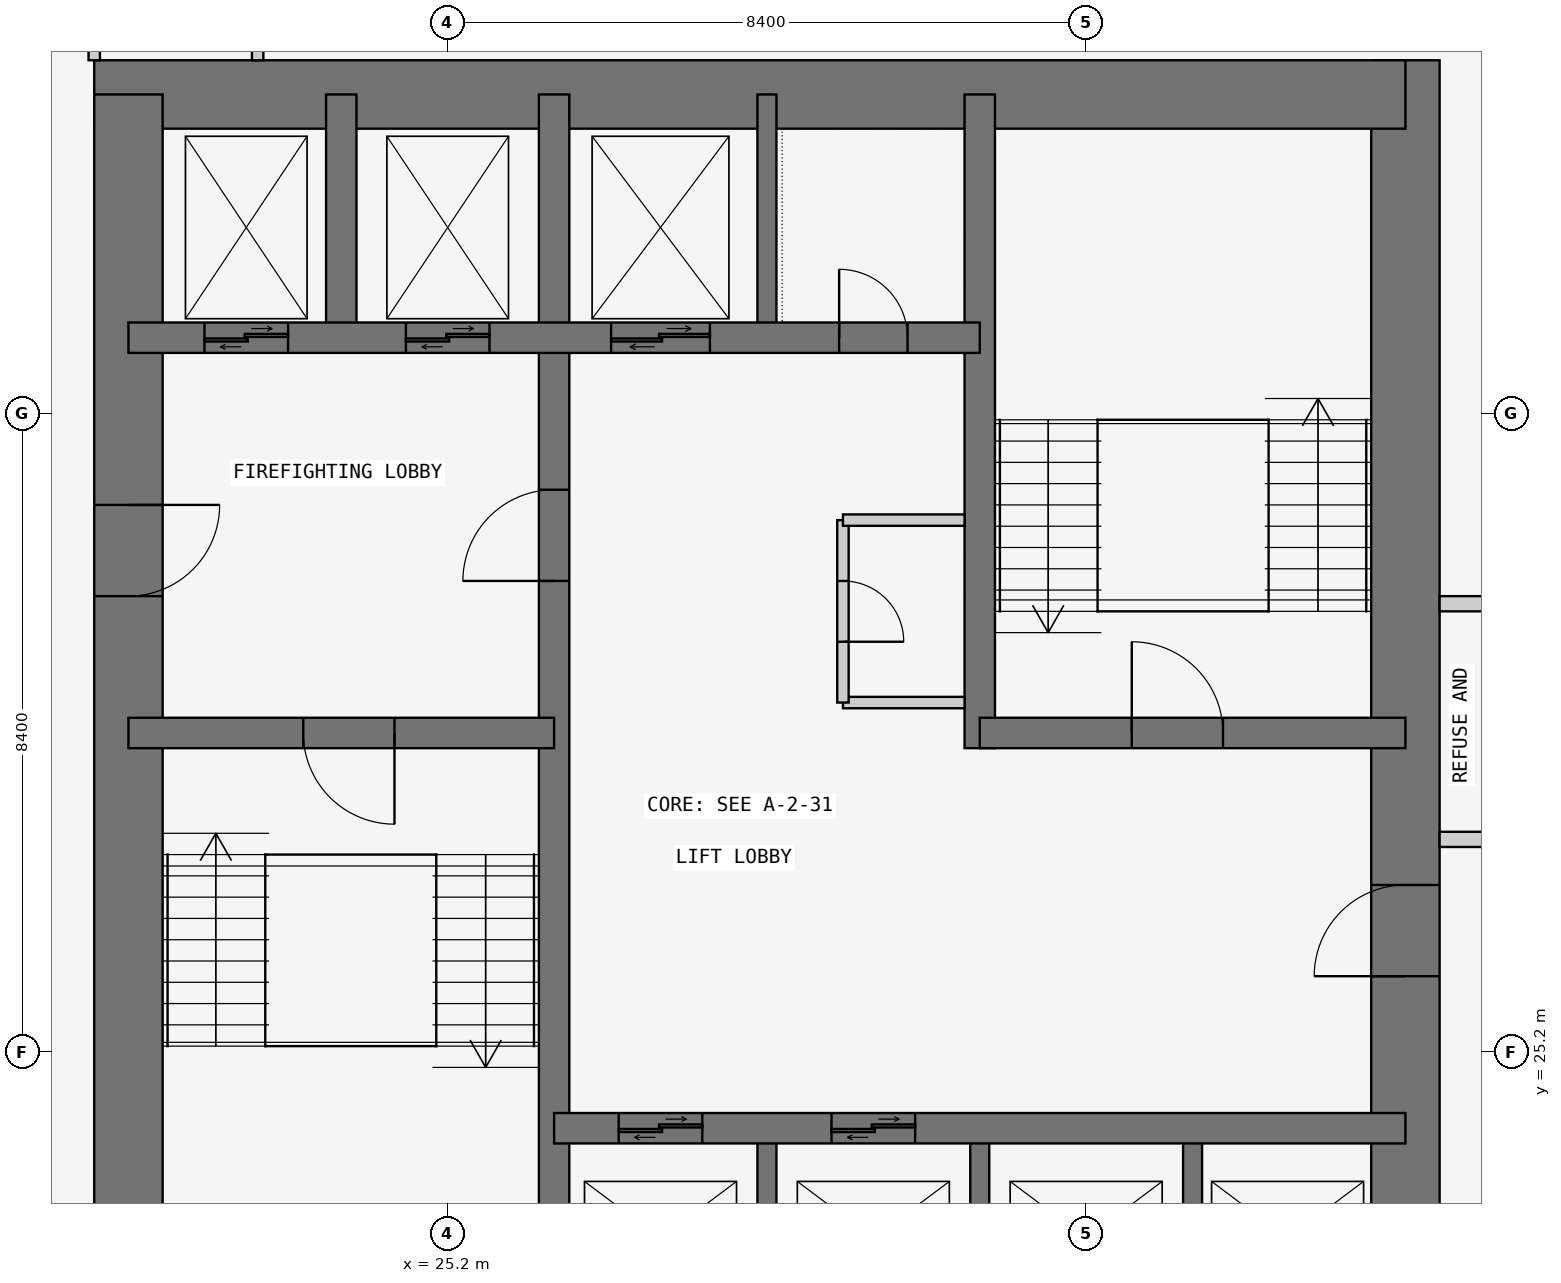
"""IFC4 building model, lengths in metres.
Left out: names, types, materials, properties, quantities, classifications, styles, units other than length and angle.
Written with IfcOpenShell. Run it as: python <this file> out.ifc"""

import sys

from ifc_helpers import new_model, si_unit, direction, frame, frame_2d, origin, place, context, subcontext, project, spatial, rectangle, extrude, element, fill, save


model = new_model("IFC4")
c1 = context("Model", 3, precision=1e-05, world=origin(), true_north=direction((0.0, 1.0)))
c2 = subcontext(c1, "Body", "Model", "MODEL_VIEW")
j1 = project(units=[si_unit("LENGTHUNIT", "METRE"), si_unit("PLANEANGLEUNIT", "RADIAN")], contexts=[c1])
p1 = place(None, origin())
s1 = spatial("IfcSite", under=j1, at=p1, CompositionType="ELEMENT")
p2 = place(p1, origin())
s2 = spatial("IfcBuilding", under=s1, at=p2, CompositionType="ELEMENT")
p3 = place(p2, frame((0.0, 0.0, 112.5)))
s3 = spatial("IfcBuildingStorey", under=s2, at=p3, CompositionType="ELEMENT", Elevation=112.5)
p4 = place(p3, frame((37.8, 21.0, 0.0), z_axis=(0.0, 0.0, 1.0), x_axis=(0.0, 1.0, 0.0)))
e1 = element("IfcWall", 1, at=p4, inside=s3, PredefinedType="SHEAR", context=c2, shape_type="SweptSolid", body=[
    extrude(rectangle(XDim=17.25, YDim=0.9, at=frame_2d((8.625, 0.0))), origin(), (0.0, 0.0, 1.0), 3.6),
])
p5 = place(p4, frame((5.2, 0.0, 0.0)))
e2 = element("IfcOpeningElement", 2, at=p5, cuts=e1, PredefinedType="OPENING", context=c2, shape_type="SweptSolid", body=[
    extrude(rectangle(XDim=1.2, YDim=2.1, at=frame_2d((0.6, 1.05))), frame((0.0, 0.46, 0.0), z_axis=(0.0, -1.0, 0.0), x_axis=(1.0, 0.0, 0.0)), (0.0, 0.0, 1.0), 0.92),
])
p6 = place(p3, frame((37.8, 37.8, 0.0), z_axis=(0.0, 0.0, 1.0), x_axis=(-1.0, 0.0, 0.0)))
e3 = element("IfcWall", 3, at=p6, inside=s3, PredefinedType="SHEAR", context=c2, shape_type="SweptSolid", body=[
    extrude(rectangle(XDim=17.25, YDim=0.9, at=frame_2d((8.625, 0.0))), origin(), (0.0, 0.0, 1.0), 3.6),
])
p7 = place(p3, frame((21.0, 37.8, 0.0), z_axis=(0.0, 0.0, 1.0), x_axis=(0.0, -1.0, 0.0)))
e4 = element("IfcWall", 4, at=p7, inside=s3, PredefinedType="SHEAR", context=c2, shape_type="SweptSolid", body=[
    extrude(rectangle(XDim=17.25, YDim=0.9, at=frame_2d((8.625, 0.0))), origin(), (0.0, 0.0, 1.0), 3.6),
])
p8 = place(p7, frame((5.4, 0.0, 0.0)))
e5 = element("IfcOpeningElement", 5, at=p8, cuts=e4, PredefinedType="OPENING", context=c2, shape_type="SweptSolid", body=[
    extrude(rectangle(XDim=1.2, YDim=2.1, at=frame_2d((0.6, 1.05))), frame((0.0, 0.46, 0.0), z_axis=(0.0, -1.0, 0.0), x_axis=(1.0, 0.0, 0.0)), (0.0, 0.0, 1.0), 0.92),
])
p9 = place(p3, frame((26.6, 21.0, 0.0), z_axis=(0.0, 0.0, 1.0), x_axis=(0.0, 1.0, 0.0)))
e6 = element("IfcWall", 6, at=p9, inside=s3, PredefinedType="SHEAR", context=c2, shape_type="SweptSolid", body=[
    extrude(rectangle(XDim=16.8, YDim=0.4, at=frame_2d((8.4, 0.0))), origin(), (0.0, 0.0, 1.0), 3.6),
])
p10 = place(p9, frame((10.4, 0.0, 0.0)))
e7 = element("IfcOpeningElement", 7, at=p10, cuts=e6, PredefinedType="OPENING", context=c2, shape_type="SweptSolid", body=[
    extrude(rectangle(XDim=1.2, YDim=2.1, at=frame_2d((0.6, 1.05))), frame((0.0, 0.21, 0.0), z_axis=(0.0, -1.0, 0.0), x_axis=(1.0, 0.0, 0.0)), (0.0, 0.0, 1.0), 0.42),
])
p11 = place(p3, frame((21.0, 29.4, 0.0), z_axis=(0.0, 0.0, 1.0), x_axis=(1.0, 0.0, 0.0)))
e8 = element("IfcWall", 8, at=p11, inside=s3, PredefinedType="SHEAR", context=c2, shape_type="SweptSolid", body=[
    extrude(rectangle(XDim=5.6, YDim=0.4, at=frame_2d((2.8, 0.0))), origin(), (0.0, 0.0, 1.0), 3.6),
])
p12 = place(p11, frame((2.3, 0.0, 0.0)))
e9 = element("IfcOpeningElement", 9, at=p12, cuts=e8, PredefinedType="OPENING", context=c2, shape_type="SweptSolid", body=[
    extrude(rectangle(XDim=1.2, YDim=2.1, at=frame_2d((0.6, 1.05))), frame((0.0, 0.21, 0.0), z_axis=(0.0, -1.0, 0.0), x_axis=(1.0, 0.0, 0.0)), (0.0, 0.0, 1.0), 0.42),
])
p13 = place(p3, frame((21.0, 34.6, 0.0), z_axis=(0.0, 0.0, 1.0), x_axis=(1.0, 0.0, 0.0)))
e10 = element("IfcWall", 10, at=p13, inside=s3, PredefinedType="SHEAR", context=c2, shape_type="SweptSolid", body=[
    extrude(rectangle(XDim=11.2, YDim=0.4, at=frame_2d((5.6, 0.0))), origin(), (0.0, 0.0, 1.0), 3.6),
])
p14 = place(p13, frame((9.35, 0.0, 0.0)))
e11 = element("IfcOpeningElement", 11, at=p14, cuts=e10, PredefinedType="OPENING", context=c2, shape_type="SweptSolid", body=[
    extrude(rectangle(XDim=0.9, YDim=2.1, at=frame_2d((0.45, 1.05))), frame((0.0, 0.21, 0.0), z_axis=(0.0, -1.0, 0.0), x_axis=(1.0, 0.0, 0.0)), (0.0, 0.0, 1.0), 0.42),
])
p15 = place(p13, frame((1.0, 0.0, 0.0)))
e12 = element("IfcOpeningElement", 12, at=p15, cuts=e10, PredefinedType="OPENING", context=c2, shape_type="SweptSolid", body=[
    extrude(rectangle(XDim=1.1, YDim=2.1, at=frame_2d((0.55, 1.05))), frame((0.0, 0.21, 0.0), z_axis=(0.0, -1.0, 0.0), x_axis=(1.0, 0.0, 0.0)), (0.0, 0.0, 1.0), 0.42),
])
p16 = place(p13, frame((3.65, 0.0, 0.0)))
e13 = element("IfcOpeningElement", 13, at=p16, cuts=e10, PredefinedType="OPENING", context=c2, shape_type="SweptSolid", body=[
    extrude(rectangle(XDim=1.1, YDim=2.1, at=frame_2d((0.55, 1.05))), frame((0.0, 0.21, 0.0), z_axis=(0.0, -1.0, 0.0), x_axis=(1.0, 0.0, 0.0)), (0.0, 0.0, 1.0), 0.42),
])
p17 = place(p13, frame((6.35, 0.0, 0.0)))
e14 = element("IfcOpeningElement", 14, at=p17, cuts=e10, PredefinedType="OPENING", context=c2, shape_type="SweptSolid", body=[
    extrude(rectangle(XDim=1.3, YDim=2.1, at=frame_2d((0.65, 1.05))), frame((0.0, 0.21, 0.0), z_axis=(0.0, -1.0, 0.0), x_axis=(1.0, 0.0, 0.0)), (0.0, 0.0, 1.0), 0.42),
])
p18 = place(p3, frame((23.8, 34.6, 0.0), z_axis=(0.0, 0.0, 1.0), x_axis=(0.0, 1.0, 0.0)))
e15 = element("IfcWall", 15, at=p18, inside=s3, PredefinedType="SHEAR", context=c2, shape_type="SweptSolid", body=[
    extrude(rectangle(XDim=3.2, YDim=0.4, at=frame_2d((1.6, 0.0))), origin(), (0.0, 0.0, 1.0), 3.6),
])
p19 = place(p3, frame((26.6, 24.2, 0.0), z_axis=(0.0, 0.0, 1.0), x_axis=(1.0, 0.0, 0.0)))
e16 = element("IfcWall", 16, at=p19, inside=s3, PredefinedType="SHEAR", context=c2, shape_type="SweptSolid", body=[
    extrude(rectangle(XDim=11.2, YDim=0.4, at=frame_2d((5.6, 0.0))), origin(), (0.0, 0.0, 1.0), 3.6),
])
p20 = place(p19, frame((0.85, 0.0, 0.0)))
e17 = element("IfcOpeningElement", 17, at=p20, cuts=e16, PredefinedType="OPENING", context=c2, shape_type="SweptSolid", body=[
    extrude(rectangle(XDim=1.1, YDim=2.1, at=frame_2d((0.55, 1.05))), frame((0.0, 0.21, 0.0), z_axis=(0.0, -1.0, 0.0), x_axis=(1.0, 0.0, 0.0)), (0.0, 0.0, 1.0), 0.42),
])
p21 = place(p19, frame((3.65, 0.0, 0.0)))
e18 = element("IfcOpeningElement", 18, at=p21, cuts=e16, PredefinedType="OPENING", context=c2, shape_type="SweptSolid", body=[
    extrude(rectangle(XDim=1.1, YDim=2.1, at=frame_2d((0.55, 1.05))), frame((0.0, 0.21, 0.0), z_axis=(0.0, -1.0, 0.0), x_axis=(1.0, 0.0, 0.0)), (0.0, 0.0, 1.0), 0.42),
])
p22 = place(p3, frame((32.2, 29.2, 0.0), z_axis=(0.0, 0.0, 1.0), x_axis=(0.0, 1.0, 0.0)))
e19 = element("IfcWall", 19, at=p22, inside=s3, PredefinedType="SHEAR", context=c2, shape_type="SweptSolid", body=[
    extrude(rectangle(XDim=8.6, YDim=0.4, at=frame_2d((4.3, 0.0))), origin(), (0.0, 0.0, 1.0), 3.6),
])
p23 = place(p3, frame((32.2, 29.4, 0.0), z_axis=(0.0, 0.0, 1.0), x_axis=(1.0, 0.0, 0.0)))
e20 = element("IfcWall", 20, at=p23, inside=s3, PredefinedType="SHEAR", context=c2, shape_type="SweptSolid", body=[
    extrude(rectangle(XDim=5.6, YDim=0.4, at=frame_2d((2.8, 0.0))), origin(), (0.0, 0.0, 1.0), 3.6),
])
p24 = place(p23, frame((2.0, 0.0, 0.0)))
e21 = element("IfcOpeningElement", 21, at=p24, cuts=e20, PredefinedType="OPENING", context=c2, shape_type="SweptSolid", body=[
    extrude(rectangle(XDim=1.2, YDim=2.1, at=frame_2d((0.6, 1.05))), frame((0.0, 0.21, 0.0), z_axis=(0.0, -1.0, 0.0), x_axis=(1.0, 0.0, 0.0)), (0.0, 0.0, 1.0), 0.42),
])
for number, where, z_axis, x_axis in (
    (22, (29.4, 21.0, 0.0), (0.0, 0.0, 1.0), (0.0, 1.0, 0.0)),
    (23, (32.2, 21.0, 0.0), (0.0, 0.0, 1.0), (0.0, 1.0, 0.0)),
    (24, (35.0, 21.0, 0.0), (0.0, 0.0, 1.0), (0.0, 1.0, 0.0)),
    (25, (29.4, 34.6, 0.0), (0.0, 0.0, 1.0), (0.0, 1.0, 0.0)),
):
    element("IfcWall", number, at=place(p3, frame(where, z_axis=z_axis, x_axis=x_axis)), inside=s3, PredefinedType="SHEAR", context=c2, shape_type="SweptSolid", body=[
        extrude(rectangle(XDim=3.2, YDim=0.25, at=frame_2d((1.6, 0.0))), origin(), (0.0, 0.0, 1.0), 3.6),
    ])
for number, where, z_axis, x_axis in (
    (26, (22.7, 38.25, 0.0), (0.0, 0.0, 1.0), (0.0, 1.0, 0.0)),
    (27, (20.55, 40.25, 0.0), (0.0, 0.0, 1.0), (0.0, -1.0, 0.0)),
):
    element("IfcWall", number, at=place(p3, frame(where, z_axis=z_axis, x_axis=x_axis)), inside=s3, PredefinedType="PARTITIONING", context=c2, shape_type="SweptSolid", body=[
        extrude(rectangle(XDim=2.0, YDim=0.15, at=frame_2d((1.0, 0.0))), origin(), (0.0, 0.0, 1.0), 3.45),
    ])
for number, where, z_axis, x_axis in (
    (28, (38.25, 28.0, 0.0), (0.0, 0.0, 1.0), (1.0, 0.0, 0.0)),
    (29, (40.6, 31.1, 0.0), (0.0, 0.0, 1.0), (-1.0, 0.0, 0.0)),
):
    element("IfcWall", number, at=place(p3, frame(where, z_axis=z_axis, x_axis=x_axis)), inside=s3, PredefinedType="PARTITIONING", context=c2, shape_type="SweptSolid", body=[
        extrude(rectangle(XDim=2.35, YDim=0.2, at=frame_2d((1.175, 0.0))), origin(), (0.0, 0.0, 1.0), 3.45),
    ])
p25 = place(p3, frame((32.0, 29.8, 0.0), z_axis=(0.0, 0.0, 1.0), x_axis=(-1.0, 0.0, 0.0)))
e30 = element("IfcWall", 30, at=p25, inside=s3, PredefinedType="PARTITIONING", context=c2, shape_type="SweptSolid", body=[
    extrude(rectangle(XDim=1.6, YDim=0.15, at=frame_2d((0.8, 0.0))), origin(), (0.0, 0.0, 1.0), 3.45),
])
p26 = place(p3, frame((30.4, 29.8, 0.0), z_axis=(0.0, 0.0, 1.0), x_axis=(0.0, 1.0, 0.0)))
e31 = element("IfcWall", 31, at=p26, inside=s3, PredefinedType="PARTITIONING", context=c2, shape_type="SweptSolid", body=[
    extrude(rectangle(XDim=2.4, YDim=0.15, at=frame_2d((1.2, 0.0))), origin(), (0.0, 0.0, 1.0), 3.45),
])
p27 = place(p26, frame((0.8, 0.0, 0.0)))
e32 = element("IfcOpeningElement", 32, at=p27, cuts=e31, PredefinedType="OPENING", context=c2, shape_type="SweptSolid", body=[
    extrude(rectangle(XDim=0.8, YDim=2.1, at=frame_2d((0.4, 1.05))), frame((0.0, 0.085, 0.0), z_axis=(0.0, -1.0, 0.0), x_axis=(1.0, 0.0, 0.0)), (0.0, 0.0, 1.0), 0.17),
])
p28 = place(p3, frame((30.4, 32.2, 0.0), z_axis=(0.0, 0.0, 1.0), x_axis=(1.0, 0.0, 0.0)))
e33 = element("IfcWall", 33, at=p28, inside=s3, PredefinedType="PARTITIONING", context=c2, shape_type="SweptSolid", body=[
    extrude(rectangle(XDim=1.6, YDim=0.15, at=frame_2d((0.8, 0.0))), origin(), (0.0, 0.0, 1.0), 3.45),
])
p29 = place(p8, origin())
e34 = element("IfcDoor", 34, at=p29, inside=s3, OperationType="SINGLE_SWING_LEFT", PredefinedType="DOOR", context=c2, shape_type="SweptSolid", body=[
    extrude(rectangle(XDim=1.2, YDim=2.1, at=frame_2d((0.6, 1.05))), frame((0.0, 0.025, 0.0), z_axis=(0.0, -1.0, 0.0), x_axis=(1.0, 0.0, 0.0)), (0.0, 0.0, 1.0), 0.05),
])
fill(e5, e34)
p30 = place(p12, frame((1.2, 0.0, 0.0), z_axis=(0.0, 0.0, 1.0), x_axis=(-1.0, 0.0, 0.0)))
e35 = element("IfcDoor", 35, at=p30, inside=s3, OperationType="SINGLE_SWING_LEFT", PredefinedType="DOOR", context=c2, shape_type="SweptSolid", body=[
    extrude(rectangle(XDim=1.2, YDim=2.1, at=frame_2d((0.6, 1.05))), frame((0.0, 0.025, 0.0), z_axis=(0.0, -1.0, 0.0), x_axis=(1.0, 0.0, 0.0)), (0.0, 0.0, 1.0), 0.05),
])
fill(e9, e35)
p31 = place(p10, origin())
e36 = element("IfcDoor", 36, at=p31, inside=s3, OperationType="SINGLE_SWING_LEFT", PredefinedType="DOOR", context=c2, shape_type="SweptSolid", body=[
    extrude(rectangle(XDim=1.2, YDim=2.1, at=frame_2d((0.6, 1.05))), frame((0.0, 0.025, 0.0), z_axis=(0.0, -1.0, 0.0), x_axis=(1.0, 0.0, 0.0)), (0.0, 0.0, 1.0), 0.05),
])
fill(e7, e36)
p32 = place(p5, origin())
e37 = element("IfcDoor", 37, at=p32, inside=s3, OperationType="SINGLE_SWING_LEFT", PredefinedType="DOOR", context=c2, shape_type="SweptSolid", body=[
    extrude(rectangle(XDim=1.2, YDim=2.1, at=frame_2d((0.6, 1.05))), frame((0.0, 0.025, 0.0), z_axis=(0.0, -1.0, 0.0), x_axis=(1.0, 0.0, 0.0)), (0.0, 0.0, 1.0), 0.05),
])
fill(e2, e37)
p33 = place(p24, origin())
e38 = element("IfcDoor", 38, at=p33, inside=s3, OperationType="SINGLE_SWING_LEFT", PredefinedType="DOOR", context=c2, shape_type="SweptSolid", body=[
    extrude(rectangle(XDim=1.2, YDim=2.1, at=frame_2d((0.6, 1.05))), frame((0.0, 0.025, 0.0), z_axis=(0.0, -1.0, 0.0), x_axis=(1.0, 0.0, 0.0)), (0.0, 0.0, 1.0), 0.05),
])
fill(e21, e38)
p34 = place(p14, origin())
e39 = element("IfcDoor", 39, at=p34, inside=s3, OperationType="SINGLE_SWING_LEFT", PredefinedType="DOOR", context=c2, shape_type="SweptSolid", body=[
    extrude(rectangle(XDim=0.9, YDim=2.1, at=frame_2d((0.45, 1.05))), frame((0.0, 0.025, 0.0), z_axis=(0.0, -1.0, 0.0), x_axis=(1.0, 0.0, 0.0)), (0.0, 0.0, 1.0), 0.05),
])
fill(e11, e39)
p35 = place(p27, frame((0.8, 0.0, 0.0), z_axis=(0.0, 0.0, 1.0), x_axis=(-1.0, 0.0, 0.0)))
e40 = element("IfcDoor", 40, at=p35, inside=s3, OperationType="SINGLE_SWING_RIGHT", PredefinedType="DOOR", context=c2, shape_type="SweptSolid", body=[
    extrude(rectangle(XDim=0.8, YDim=2.1, at=frame_2d((0.4, 1.05))), frame((0.0, 0.025, 0.0), z_axis=(0.0, -1.0, 0.0), x_axis=(1.0, 0.0, 0.0)), (0.0, 0.0, 1.0), 0.05),
])
fill(e32, e40)
p36 = place(p20, origin())
e41 = element("IfcDoor", 41, at=p36, inside=s3, OperationType="DOUBLE_DOOR_SLIDING", PredefinedType="DOOR", context=c2, shape_type="SweptSolid", body=[
    extrude(rectangle(XDim=1.1, YDim=2.1, at=frame_2d((0.55, 1.05))), frame((0.0, 0.025, 0.0), z_axis=(0.0, -1.0, 0.0), x_axis=(1.0, 0.0, 0.0)), (0.0, 0.0, 1.0), 0.05),
])
fill(e17, e41)
p37 = place(p21, origin())
e42 = element("IfcDoor", 42, at=p37, inside=s3, OperationType="DOUBLE_DOOR_SLIDING", PredefinedType="DOOR", context=c2, shape_type="SweptSolid", body=[
    extrude(rectangle(XDim=1.1, YDim=2.1, at=frame_2d((0.55, 1.05))), frame((0.0, 0.025, 0.0), z_axis=(0.0, -1.0, 0.0), x_axis=(1.0, 0.0, 0.0)), (0.0, 0.0, 1.0), 0.05),
])
fill(e18, e42)
p38 = place(p15, origin())
e43 = element("IfcDoor", 43, at=p38, inside=s3, OperationType="DOUBLE_DOOR_SLIDING", PredefinedType="DOOR", context=c2, shape_type="SweptSolid", body=[
    extrude(rectangle(XDim=1.1, YDim=2.1, at=frame_2d((0.55, 1.05))), frame((0.0, 0.025, 0.0), z_axis=(0.0, -1.0, 0.0), x_axis=(1.0, 0.0, 0.0)), (0.0, 0.0, 1.0), 0.05),
])
fill(e12, e43)
p39 = place(p16, origin())
e44 = element("IfcDoor", 44, at=p39, inside=s3, OperationType="DOUBLE_DOOR_SLIDING", PredefinedType="DOOR", context=c2, shape_type="SweptSolid", body=[
    extrude(rectangle(XDim=1.1, YDim=2.1, at=frame_2d((0.55, 1.05))), frame((0.0, 0.025, 0.0), z_axis=(0.0, -1.0, 0.0), x_axis=(1.0, 0.0, 0.0)), (0.0, 0.0, 1.0), 0.05),
])
fill(e13, e44)
p40 = place(p17, origin())
e45 = element("IfcDoor", 45, at=p40, inside=s3, OperationType="DOUBLE_DOOR_SLIDING", PredefinedType="DOOR", context=c2, shape_type="SweptSolid", body=[
    extrude(rectangle(XDim=1.3, YDim=2.1, at=frame_2d((0.65, 1.05))), frame((0.0, 0.025, 0.0), z_axis=(0.0, -1.0, 0.0), x_axis=(1.0, 0.0, 0.0)), (0.0, 0.0, 1.0), 0.05),
])
fill(e14, e45)
save(model, sys.argv[1])
